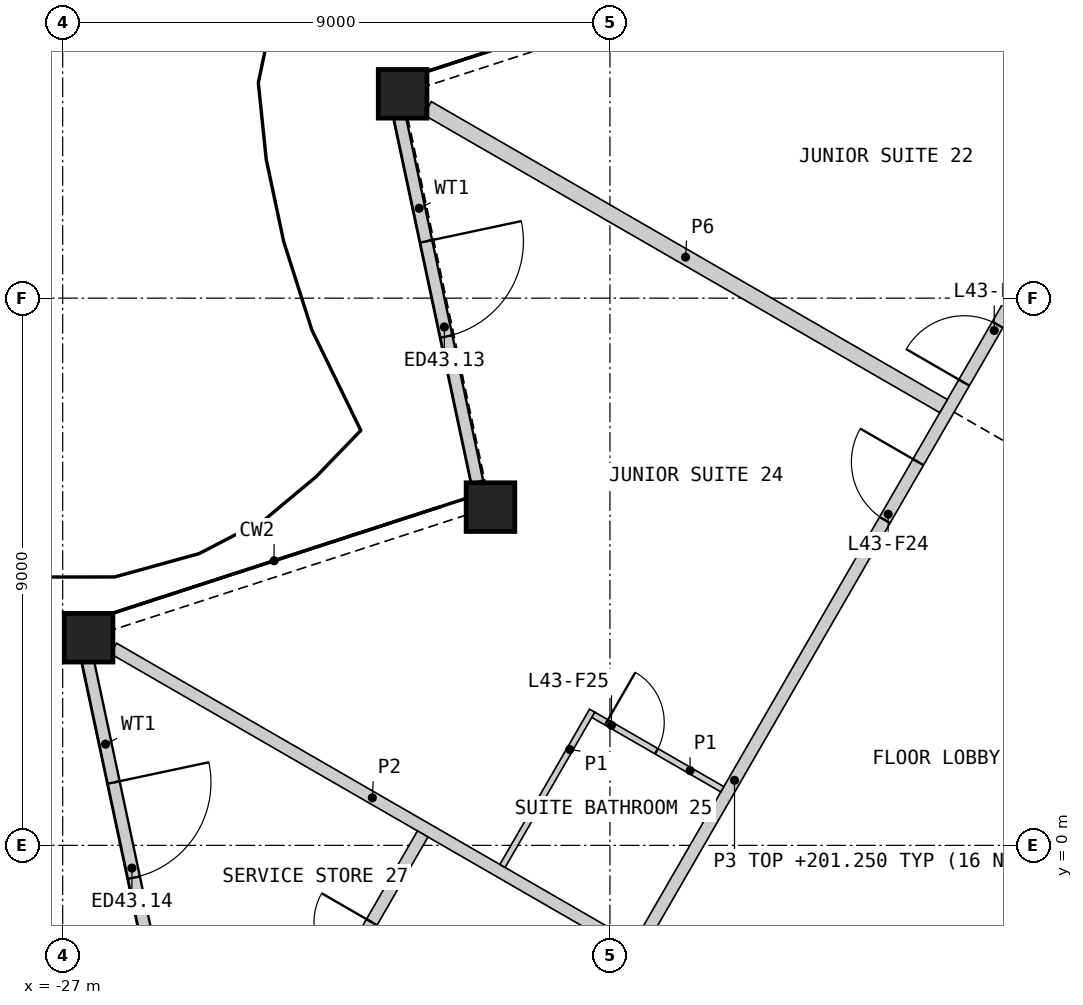
"""IFC4 building model, lengths in metres.
Left out: names, types, materials, properties, quantities, classifications, styles, units other than length and angle.
Written with IfcOpenShell. Run it as: python <this file> out.ifc"""

import sys

from ifc_helpers import new_model, si_unit, direction, frame, frame_2d, origin, origin_2d, place, context, subcontext, project, spatial, rectangle, hollow_rectangle, extrude, element, fill, save


model = new_model("IFC4")
c1 = context("Model", 3, precision=1e-05, world=origin(), true_north=direction((0.0, 1.0)))
c2 = subcontext(c1, "Body", "Model", "MODEL_VIEW")
j1 = project(units=[si_unit("LENGTHUNIT", "METRE"), si_unit("PLANEANGLEUNIT", "RADIAN")], contexts=[c1])
p1 = place(None, origin())
s1 = spatial("IfcSite", under=j1, at=p1, CompositionType="ELEMENT")
p2 = place(p1, origin())
s2 = spatial("IfcBuilding", under=s1, at=p2, CompositionType="ELEMENT")
p3 = place(p2, frame((0.0, 0.0, 198.0)))
s3 = spatial("IfcBuildingStorey", under=s2, at=p3, CompositionType="ELEMENT", Elevation=198.0)
for number, where, z_axis, x_axis in (
    (1, (-21.409, 12.361, 0.0), (0.0, 0.0, 1.0), (1.0, 0.0, 0.0)),
    (2, (-19.965, 5.563, 0.0), (0.0, 0.0, 1.0), (1.0, 0.0, 0.0)),
    (3, (-26.574, 3.415, 0.0), (0.0, 0.0, 1.0), (1.0, 0.0, 0.0)),
):
    element("IfcColumn", number, at=place(p3, frame(where, z_axis=z_axis, x_axis=x_axis)), inside=s3, PredefinedType="COLUMN", context=c2, shape_type="SweptSolid", body=[
        extrude(hollow_rectangle(XDim=0.8, YDim=0.8, WallThickness=0.05, at=origin_2d()), origin(), (0.0, 0.0, 1.0), 3.6),
    ])
p4 = place(p3, frame((-21.457, 11.978, 0.0), z_axis=(0.0, 0.0, 1.0), x_axis=(0.207930174887, -0.978143671641, 0.0)))
e4 = element("IfcWall", 4, at=p4, inside=s3, PredefinedType="SOLIDWALL", context=c2, shape_type="SweptSolid", body=[
    extrude(rectangle(XDim=6.133, YDim=0.2, at=frame_2d((3.066, 0.0))), origin(), (0.0, 0.0, 1.0), 2.701),
])
p5 = place(p4, frame((2.089, 0.0, 0.0)))
e5 = element("IfcOpeningElement", 5, at=p5, cuts=e4, PredefinedType="OPENING", context=c2, shape_type="SweptSolid", body=[
    extrude(rectangle(XDim=1.6, YDim=2.4, at=frame_2d((0.8, 1.2))), frame((0.0, 0.11, 0.0), z_axis=(0.0, -1.0, 0.0), x_axis=(1.0, 0.0, 0.0)), (0.0, 0.0, 1.0), 0.22),
])
p6 = place(p3, frame((-26.595, 3.078, 0.0), z_axis=(0.0, 0.0, 1.0), x_axis=(0.207907263894, -0.978148541695, 0.0)))
e6 = element("IfcWall", 6, at=p6, inside=s3, PredefinedType="SOLIDWALL", context=c2, shape_type="SweptSolid", body=[
    extrude(rectangle(XDim=5.779, YDim=0.2, at=frame_2d((2.889, 0.0))), origin(), (0.0, 0.0, 1.0), 2.701),
])
p7 = place(p6, frame((2.089, 0.0, 0.0)))
e7 = element("IfcOpeningElement", 7, at=p7, cuts=e6, PredefinedType="OPENING", context=c2, shape_type="SweptSolid", body=[
    extrude(rectangle(XDim=1.6, YDim=2.4, at=frame_2d((0.8, 1.2))), frame((0.0, 0.11, 0.0), z_axis=(0.0, -1.0, 0.0), x_axis=(1.0, 0.0, 0.0)), (0.0, 0.0, 1.0), 0.22),
])
p8 = place(p3, frame((-9.625, 0.477, 0.0), z_axis=(0.0, 0.0, 1.0), x_axis=(-0.499951145694, -0.866053607994, 0.0)))
e8 = element("IfcWall", 8, at=p8, inside=s3, PredefinedType="SHEAR", context=c2, shape_type="SweptSolid", body=[
    extrude(rectangle(XDim=3.851, YDim=0.75, at=frame_2d((1.925, 0.0))), origin(), (0.0, 0.0, 1.0), 3.25),
])
p9 = place(p3, frame((-19.476, -5.035, 0.0), z_axis=(0.0, 0.0, 1.0), x_axis=(0.500000757641, 0.86602496636, 0.0)))
e9 = element("IfcWall", 9, at=p9, inside=s3, PredefinedType="PARTITIONING", context=c2, shape_type="SweptSolid", body=[
    extrude(rectangle(XDim=28.198, YDim=0.2, at=frame_2d((14.099, 0.0))), origin(), (0.0, 0.0, 1.0), 3.25),
])
p10 = place(p9, frame((25.796, 0.0, 0.0)))
e10 = element("IfcOpeningElement", 10, at=p10, cuts=e9, PredefinedType="OPENING", context=c2, shape_type="SweptSolid", body=[
    extrude(rectangle(XDim=0.95, YDim=2.1, at=frame_2d((0.475, 1.05))), frame((0.0, 0.11, 0.0), z_axis=(0.0, -1.0, 0.0), x_axis=(1.0, 0.0, 0.0)), (0.0, 0.0, 1.0), 0.22),
])
p11 = place(p9, frame((14.603, 0.0, 0.0)))
e11 = element("IfcOpeningElement", 11, at=p11, cuts=e9, PredefinedType="OPENING", context=c2, shape_type="SweptSolid", body=[
    extrude(rectangle(XDim=1.1, YDim=2.1, at=frame_2d((0.55, 1.05))), frame((0.0, 0.11, 0.0), z_axis=(0.0, -1.0, 0.0), x_axis=(1.0, 0.0, 0.0)), (0.0, 0.0, 1.0), 0.22),
])
p12 = place(p9, frame((11.993, 0.0, 0.0)))
e12 = element("IfcOpeningElement", 12, at=p12, cuts=e9, PredefinedType="OPENING", context=c2, shape_type="SweptSolid", body=[
    extrude(rectangle(XDim=1.1, YDim=2.1, at=frame_2d((0.55, 1.05))), frame((0.0, 0.11, 0.0), z_axis=(0.0, -1.0, 0.0), x_axis=(1.0, 0.0, 0.0)), (0.0, 0.0, 1.0), 0.22),
])
p13 = place(p9, frame((1.452, 0.0, 0.0)))
e13 = element("IfcOpeningElement", 13, at=p13, cuts=e9, PredefinedType="OPENING", context=c2, shape_type="SweptSolid", body=[
    extrude(rectangle(XDim=0.95, YDim=2.1, at=frame_2d((0.475, 1.05))), frame((0.0, 0.11, 0.0), z_axis=(0.0, -1.0, 0.0), x_axis=(1.0, 0.0, 0.0)), (0.0, 0.0, 1.0), 0.22),
])
p14 = place(p3, frame((-21.0, 12.124, 0.0), z_axis=(0.0, 0.0, 1.0), x_axis=(0.866032905446, -0.499987006516, 0.0)))
e14 = element("IfcWall", 14, at=p14, inside=s3, PredefinedType="PARTITIONING", context=c2, shape_type="SweptSolid", body=[
    extrude(rectangle(XDim=9.799, YDim=0.25, at=frame_2d((4.899, 0.0))), origin(), (0.0, 0.0, 1.0), 2.404),
])
p15 = place(p3, frame((-26.164, 3.239, 0.0), z_axis=(0.0, 0.0, 1.0), x_axis=(0.866025932773, -0.499999083763, 0.0)))
e15 = element("IfcWall", 15, at=p15, inside=s3, PredefinedType="PARTITIONING", context=c2, shape_type="SweptSolid", body=[
    extrude(rectangle(XDim=9.83, YDim=0.2, at=frame_2d((4.915, 0.0))), origin(), (0.0, 0.0, 1.0), 2.404),
])
p16 = place(p3, frame((-24.045, -4.949, 0.0), z_axis=(0.0, 0.0, 1.0), x_axis=(0.500016988964, 0.866015594979, 0.0)))
e16 = element("IfcWall", 16, at=p16, inside=s3, PredefinedType="PARTITIONING", context=c2, shape_type="SweptSolid", body=[
    extrude(rectangle(XDim=5.931, YDim=0.2, at=frame_2d((2.966, 0.0))), origin(), (0.0, 0.0, 1.0), 2.404),
])
p17 = place(p16, frame((3.305, 0.0, 0.0)))
e17 = element("IfcOpeningElement", 17, at=p17, cuts=e16, PredefinedType="OPENING", context=c2, shape_type="SweptSolid", body=[
    extrude(rectangle(XDim=0.95, YDim=2.1, at=frame_2d((0.475, 1.05))), frame((0.0, 0.11, 0.0), z_axis=(0.0, -1.0, 0.0), x_axis=(1.0, 0.0, 0.0)), (0.0, 0.0, 1.0), 0.22),
])
p18 = place(p3, frame((-19.767, -0.339, 0.0), z_axis=(0.0, 0.0, 1.0), x_axis=(0.499939757307, 0.866060182126, 0.0)))
e18 = element("IfcWall", 18, at=p18, inside=s3, PredefinedType="PARTITIONING", context=c2, shape_type="SweptSolid", body=[
    extrude(rectangle(XDim=2.95, YDim=0.1, at=frame_2d((1.475, 0.0))), origin(), (0.0, 0.0, 1.0), 2.404),
])
p19 = place(p3, frame((-18.273, 2.147, 0.0), z_axis=(0.0, 0.0, 1.0), x_axis=(0.866014668023, -0.500018594424, 0.0)))
e19 = element("IfcWall", 19, at=p19, inside=s3, PredefinedType="PARTITIONING", context=c2, shape_type="SweptSolid", body=[
    extrude(rectangle(XDim=2.45, YDim=0.1, at=frame_2d((1.225, 0.0))), origin(), (0.0, 0.0, 1.0), 2.404),
])
p20 = place(p19, frame((0.25, 0.0, 0.0)))
e20 = element("IfcOpeningElement", 20, at=p20, cuts=e19, PredefinedType="OPENING", context=c2, shape_type="SweptSolid", body=[
    extrude(rectangle(XDim=0.95, YDim=2.1, at=frame_2d((0.475, 1.05))), frame((0.0, 0.06, 0.0), z_axis=(0.0, -1.0, 0.0), x_axis=(1.0, 0.0, 0.0)), (0.0, 0.0, 1.0), 0.12),
])
p21 = place(p5, origin())
e21 = element("IfcDoor", 21, at=p21, inside=s3, OperationType="DOUBLE_DOOR_SINGLE_SWING", PredefinedType="DOOR", context=c2, shape_type="SweptSolid", body=[
    extrude(rectangle(XDim=1.6, YDim=2.4, at=frame_2d((0.8, 1.2))), frame((0.0, 0.025, 0.0), z_axis=(0.0, -1.0, 0.0), x_axis=(1.0, 0.0, 0.0)), (0.0, 0.0, 1.0), 0.05),
])
fill(e5, e21)
p22 = place(p7, origin())
e22 = element("IfcDoor", 22, at=p22, inside=s3, OperationType="DOUBLE_DOOR_SINGLE_SWING", PredefinedType="DOOR", context=c2, shape_type="SweptSolid", body=[
    extrude(rectangle(XDim=1.6, YDim=2.4, at=frame_2d((0.8, 1.2))), frame((0.0, 0.025, 0.0), z_axis=(0.0, -1.0, 0.0), x_axis=(1.0, 0.0, 0.0)), (0.0, 0.0, 1.0), 0.05),
])
fill(e7, e22)
p23 = place(p11, origin())
e23 = element("IfcDoor", 23, at=p23, inside=s3, OperationType="SINGLE_SWING_LEFT", PredefinedType="DOOR", context=c2, shape_type="SweptSolid", body=[
    extrude(rectangle(XDim=1.1, YDim=2.1, at=frame_2d((0.55, 1.05))), frame((0.0, 0.025, 0.0), z_axis=(0.0, -1.0, 0.0), x_axis=(1.0, 0.0, 0.0)), (0.0, 0.0, 1.0), 0.05),
])
fill(e11, e23)
p24 = place(p12, origin())
e24 = element("IfcDoor", 24, at=p24, inside=s3, OperationType="SINGLE_SWING_RIGHT", PredefinedType="DOOR", context=c2, shape_type="SweptSolid", body=[
    extrude(rectangle(XDim=1.1, YDim=2.1, at=frame_2d((0.55, 1.05))), frame((0.0, 0.025, 0.0), z_axis=(0.0, -1.0, 0.0), x_axis=(1.0, 0.0, 0.0)), (0.0, 0.0, 1.0), 0.05),
])
fill(e12, e24)
p25 = place(p20, origin())
e25 = element("IfcDoor", 25, at=p25, inside=s3, OperationType="SINGLE_SWING_LEFT", PredefinedType="DOOR", context=c2, shape_type="SweptSolid", body=[
    extrude(rectangle(XDim=0.95, YDim=2.1, at=frame_2d((0.475, 1.05))), frame((0.0, 0.025, 0.0), z_axis=(0.0, -1.0, 0.0), x_axis=(1.0, 0.0, 0.0)), (0.0, 0.0, 1.0), 0.05),
])
fill(e20, e25)
p26 = place(p17, origin())
e26 = element("IfcDoor", 26, at=p26, inside=s3, OperationType="SINGLE_SWING_RIGHT", PredefinedType="DOOR", context=c2, shape_type="SweptSolid", body=[
    extrude(rectangle(XDim=0.95, YDim=2.1, at=frame_2d((0.475, 1.05))), frame((0.0, 0.025, 0.0), z_axis=(0.0, -1.0, 0.0), x_axis=(1.0, 0.0, 0.0)), (0.0, 0.0, 1.0), 0.05),
])
fill(e17, e26)
save(model, sys.argv[1])
